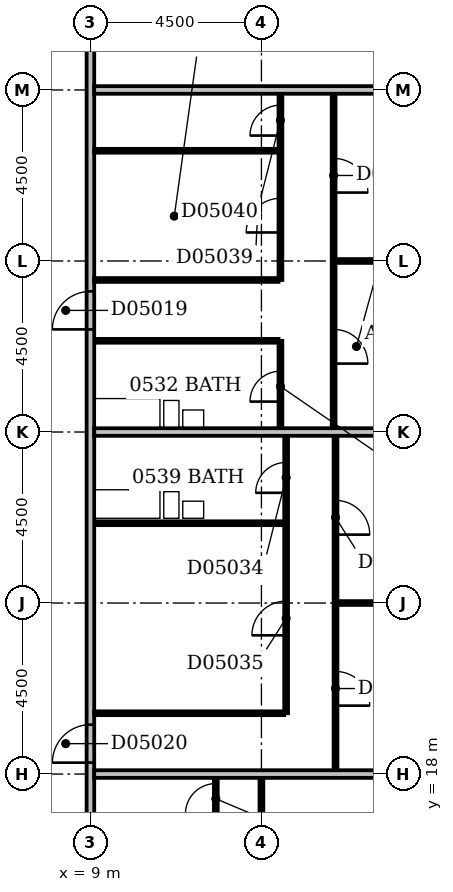
"""IFC4 building model, lengths in metres.
Left out: names, types, materials, properties, quantities, classifications, styles, units other than length and angle.
Written with IfcOpenShell. Run it as: python <this file> out.ifc"""

import sys

from ifc_helpers import new_model, si_unit, direction, frame, frame_2d, origin, place, context, subcontext, project, spatial, rectangle, extrude, element, fill, save


model = new_model("IFC4")
c1 = context("Model", 3, precision=1e-05, world=origin(), true_north=direction((0.0, 1.0)))
c2 = subcontext(c1, "Body", "Model", "MODEL_VIEW")
j1 = project(units=[si_unit("LENGTHUNIT", "METRE"), si_unit("PLANEANGLEUNIT", "RADIAN")], contexts=[c1])
p1 = place(None, origin())
s1 = spatial("IfcSite", under=j1, at=p1, CompositionType="ELEMENT")
p2 = place(p1, origin())
s2 = spatial("IfcBuilding", under=s1, at=p2, CompositionType="ELEMENT")
p3 = place(p2, frame((0.0, 0.0, 29.0)))
s3 = spatial("IfcBuildingStorey", under=s2, at=p3, CompositionType="ELEMENT", Elevation=29.0)
p4 = place(p3, frame((9.0, 5.0, 0.0), z_axis=(0.0, 0.0, 1.0), x_axis=(0.0, 1.0, 0.0)))
e1 = element("IfcWall", 1, at=p4, inside=s3, PredefinedType="PARTITIONING", context=c2, shape_type="SweptSolid", body=[
    extrude(rectangle(XDim=44.5, YDim=0.2, at=frame_2d((22.25, 0.0))), origin(), (0.0, 0.0, 1.0), 3.3),
])
p5 = place(p4, frame((24.7, 0.0, 0.0)))
e2 = element("IfcOpeningElement", 2, at=p5, cuts=e1, PredefinedType="OPENING", context=c2, shape_type="SweptSolid", body=[
    extrude(rectangle(XDim=1.0, YDim=2.1, at=frame_2d((0.5, 1.05))), frame((0.0, 0.112, 0.0), z_axis=(0.0, -1.0, 0.0), x_axis=(1.0, 0.0, 0.0)), (0.0, 0.0, 1.0), 0.224),
])
p6 = place(p4, frame((13.3, 0.0, 0.0)))
e3 = element("IfcOpeningElement", 3, at=p6, cuts=e1, PredefinedType="OPENING", context=c2, shape_type="SweptSolid", body=[
    extrude(rectangle(XDim=1.0, YDim=2.1, at=frame_2d((0.5, 1.05))), frame((0.0, 0.112, 0.0), z_axis=(0.0, -1.0, 0.0), x_axis=(1.0, 0.0, 0.0)), (0.0, 0.0, 1.0), 0.224),
])
p7 = place(p4, frame((10.45, 0.0, 0.0)))
e4 = element("IfcOpeningElement", 4, at=p7, cuts=e1, PredefinedType="OPENING", context=c2, shape_type="SweptSolid", body=[
    extrude(rectangle(XDim=1.0, YDim=2.1, at=frame_2d((0.5, 1.05))), frame((0.0, 0.112, 0.0), z_axis=(0.0, -1.0, 0.0), x_axis=(1.0, 0.0, 0.0)), (0.0, 0.0, 1.0), 0.224),
])
p8 = place(p4, frame((5.95, 0.0, 0.0)))
e5 = element("IfcOpeningElement", 5, at=p8, cuts=e1, PredefinedType="OPENING", context=c2, shape_type="SweptSolid", body=[
    extrude(rectangle(XDim=1.0, YDim=2.1, at=frame_2d((0.5, 1.05))), frame((0.0, 0.112, 0.0), z_axis=(0.0, -1.0, 0.0), x_axis=(1.0, 0.0, 0.0)), (0.0, 0.0, 1.0), 0.224),
])
p9 = place(p4, frame((37.25, 0.0, 0.0)))
e6 = element("IfcOpeningElement", 6, at=p9, cuts=e1, PredefinedType="OPENING", context=c2, shape_type="SweptSolid", body=[
    extrude(rectangle(XDim=0.9, YDim=2.1, at=frame_2d((0.45, 1.05))), frame((0.0, 0.112, 0.0), z_axis=(0.0, -1.0, 0.0), x_axis=(1.0, 0.0, 0.0)), (0.0, 0.0, 1.0), 0.224),
])
p10 = place(p4, frame((1.5, 0.0, 0.0)))
e7 = element("IfcOpeningElement", 7, at=p10, cuts=e1, PredefinedType="OPENING", context=c2, shape_type="SweptSolid", body=[
    extrude(rectangle(XDim=0.9, YDim=2.1, at=frame_2d((0.45, 1.05))), frame((0.0, 0.112, 0.0), z_axis=(0.0, -1.0, 0.0), x_axis=(1.0, 0.0, 0.0)), (0.0, 0.0, 1.0), 0.224),
])
p11 = place(p3, frame((13.5, 9.6, 0.0), z_axis=(0.0, 0.0, 1.0), x_axis=(0.0, 1.0, 0.0)))
e8 = element("IfcWall", 8, at=p11, inside=s3, PredefinedType="PARTITIONING", context=c2, shape_type="SweptSolid", body=[
    extrude(rectangle(XDim=8.3, YDim=0.1, at=frame_2d((4.15, 0.0))), origin(), (0.0, 0.0, 1.0), 3.3),
])
p12 = place(p11, frame((5.7, 0.0, 0.0)))
e9 = element("IfcOpeningElement", 9, at=p12, cuts=e8, PredefinedType="OPENING", context=c2, shape_type="SweptSolid", body=[
    extrude(rectangle(XDim=0.9, YDim=2.1, at=frame_2d((0.45, 1.05))), frame((0.0, 0.062, 0.0), z_axis=(0.0, -1.0, 0.0), x_axis=(1.0, 0.0, 0.0)), (0.0, 0.0, 1.0), 0.124),
])
p13 = place(p11, frame((1.2, 0.0, 0.0)))
e10 = element("IfcOpeningElement", 10, at=p13, cuts=e8, PredefinedType="OPENING", context=c2, shape_type="SweptSolid", body=[
    extrude(rectangle(XDim=0.9, YDim=2.1, at=frame_2d((0.45, 1.05))), frame((0.0, 0.062, 0.0), z_axis=(0.0, -1.0, 0.0), x_axis=(1.0, 0.0, 0.0)), (0.0, 0.0, 1.0), 0.124),
])
p14 = place(p3, frame((12.3, 16.7, 0.0), z_axis=(0.0, 0.0, 1.0), x_axis=(0.0, 1.0, 0.0)))
e11 = element("IfcWall", 11, at=p14, inside=s3, PredefinedType="PARTITIONING", context=c2, shape_type="SweptSolid", body=[
    extrude(rectangle(XDim=1.2, YDim=0.1, at=frame_2d((0.6, 0.0))), origin(), (0.0, 0.0, 1.0), 3.3),
])
p15 = place(p14, frame((0.25, 0.0, 0.0)))
e12 = element("IfcOpeningElement", 12, at=p15, cuts=e11, PredefinedType="OPENING", context=c2, shape_type="SweptSolid", body=[
    extrude(rectangle(XDim=0.8, YDim=2.1, at=frame_2d((0.4, 1.05))), frame((0.0, 0.062, 0.0), z_axis=(0.0, -1.0, 0.0), x_axis=(1.0, 0.0, 0.0)), (0.0, 0.0, 1.0), 0.124),
])
p16 = place(p3, frame((9.1, 18.0, 0.0), z_axis=(0.0, 0.0, 1.0), x_axis=(1.0, 0.0, 0.0)))
e13 = element("IfcWall", 13, at=p16, inside=s3, PredefinedType="PARTITIONING", context=c2, shape_type="SweptSolid", body=[
    extrude(rectangle(XDim=8.3, YDim=0.2, at=frame_2d((4.15, 0.0))), origin(), (0.0, 0.0, 1.0), 2.6),
])
p17 = place(p3, frame((15.45, 18.1, 0.0), z_axis=(0.0, 0.0, 1.0), x_axis=(0.0, 1.0, 0.0)))
e14 = element("IfcWall", 14, at=p17, inside=s3, PredefinedType="PARTITIONING", context=c2, shape_type="SweptSolid", body=[
    extrude(rectangle(XDim=8.8, YDim=0.1, at=frame_2d((4.4, 0.0))), origin(), (0.0, 0.0, 1.0), 3.3),
])
p18 = place(p17, frame((1.7, 0.0, 0.0)))
e15 = element("IfcOpeningElement", 15, at=p18, cuts=e14, PredefinedType="OPENING", context=c2, shape_type="SweptSolid", body=[
    extrude(rectangle(XDim=0.9, YDim=2.1, at=frame_2d((0.45, 1.05))), frame((0.0, 0.062, 0.0), z_axis=(0.0, -1.0, 0.0), x_axis=(1.0, 0.0, 0.0)), (0.0, 0.0, 1.0), 0.124),
])
p19 = place(p17, frame((6.2, 0.0, 0.0)))
e16 = element("IfcOpeningElement", 16, at=p19, cuts=e14, PredefinedType="OPENING", context=c2, shape_type="SweptSolid", body=[
    extrude(rectangle(XDim=0.9, YDim=2.1, at=frame_2d((0.45, 1.05))), frame((0.0, 0.062, 0.0), z_axis=(0.0, -1.0, 0.0), x_axis=(1.0, 0.0, 0.0)), (0.0, 0.0, 1.0), 0.124),
])
p20 = place(p3, frame((9.1, 19.6, 0.0), z_axis=(0.0, 0.0, 1.0), x_axis=(1.0, 0.0, 0.0)))
e17 = element("IfcWall", 17, at=p20, inside=s3, PredefinedType="PARTITIONING", context=c2, shape_type="SweptSolid", body=[
    extrude(rectangle(XDim=5.0, YDim=0.1, at=frame_2d((2.5, 0.0))), origin(), (0.0, 0.0, 1.0), 3.3),
])
p21 = place(p3, frame((14.15, 19.6, 0.0), z_axis=(0.0, 0.0, 1.0), x_axis=(0.0, 1.0, 0.0)))
e18 = element("IfcWall", 18, at=p21, inside=s3, PredefinedType="PARTITIONING", context=c2, shape_type="SweptSolid", body=[
    extrude(rectangle(XDim=7.3, YDim=0.1, at=frame_2d((3.65, 0.0))), origin(), (0.0, 0.0, 1.0), 3.3),
])
p22 = place(p21, frame((5.8, 0.0, 0.0)))
e19 = element("IfcOpeningElement", 19, at=p22, cuts=e18, PredefinedType="OPENING", context=c2, shape_type="SweptSolid", body=[
    extrude(rectangle(XDim=0.8, YDim=2.1, at=frame_2d((0.4, 1.05))), frame((0.0, 0.062, 0.0), z_axis=(0.0, -1.0, 0.0), x_axis=(1.0, 0.0, 0.0)), (0.0, 0.0, 1.0), 0.124),
])
p23 = place(p21, frame((2.05, 0.0, 0.0)))
e20 = element("IfcOpeningElement", 20, at=p23, cuts=e18, PredefinedType="OPENING", context=c2, shape_type="SweptSolid", body=[
    extrude(rectangle(XDim=0.9, YDim=2.1, at=frame_2d((0.45, 1.05))), frame((0.0, 0.062, 0.0), z_axis=(0.0, -1.0, 0.0), x_axis=(1.0, 0.0, 0.0)), (0.0, 0.0, 1.0), 0.124),
])
p24 = place(p3, frame((15.5, 22.5, 0.0), z_axis=(0.0, 0.0, 1.0), x_axis=(1.0, 0.0, 0.0)))
e21 = element("IfcWall", 21, at=p24, inside=s3, PredefinedType="PARTITIONING", context=c2, shape_type="SweptSolid", body=[
    extrude(rectangle(XDim=6.4, YDim=0.1, at=frame_2d((3.2, 0.0))), origin(), (0.0, 0.0, 1.0), 3.3),
])
p25 = place(p3, frame((9.1, 24.6, 0.0), z_axis=(0.0, 0.0, 1.0), x_axis=(1.0, 0.0, 0.0)))
e22 = element("IfcWall", 22, at=p25, inside=s3, PredefinedType="PLUMBINGWALL", context=c2, shape_type="SweptSolid", body=[
    extrude(rectangle(XDim=5.0, YDim=0.1, at=frame_2d((2.5, 0.0))), origin(), (0.0, 0.0, 1.0), 3.3),
])
p26 = place(p3, frame((9.1, 27.0, 0.0), z_axis=(0.0, 0.0, 1.0), x_axis=(1.0, 0.0, 0.0)))
e23 = element("IfcWall", 23, at=p26, inside=s3, PredefinedType="PARTITIONING", context=c2, shape_type="SweptSolid", body=[
    extrude(rectangle(XDim=12.8, YDim=0.2, at=frame_2d((6.4, 0.0))), origin(), (0.0, 0.0, 1.0), 2.7),
])
p27 = place(p3, frame((14.0, 27.1, 0.0), z_axis=(0.0, 0.0, 1.0), x_axis=(0.0, 1.0, 0.0)))
e24 = element("IfcWall", 24, at=p27, inside=s3, PredefinedType="PARTITIONING", context=c2, shape_type="SweptSolid", body=[
    extrude(rectangle(XDim=2.3, YDim=0.1, at=frame_2d((1.15, 0.0))), origin(), (0.0, 0.0, 1.0), 3.3),
])
p28 = place(p27, frame((0.7, 0.0, 0.0)))
e25 = element("IfcOpeningElement", 25, at=p28, cuts=e24, PredefinedType="OPENING", context=c2, shape_type="SweptSolid", body=[
    extrude(rectangle(XDim=0.8, YDim=2.1, at=frame_2d((0.4, 1.05))), frame((0.0, 0.062, 0.0), z_axis=(0.0, -1.0, 0.0), x_axis=(1.0, 0.0, 0.0)), (0.0, 0.0, 1.0), 0.124),
])
p29 = place(p3, frame((15.4, 27.1, 0.0), z_axis=(0.0, 0.0, 1.0), x_axis=(0.0, 1.0, 0.0)))
e26 = element("IfcWall", 26, at=p29, inside=s3, PredefinedType="PARTITIONING", context=c2, shape_type="SweptSolid", body=[
    extrude(rectangle(XDim=8.8, YDim=0.1, at=frame_2d((4.4, 0.0))), origin(), (0.0, 0.0, 1.0), 3.3),
])
p30 = place(p29, frame((1.7, 0.0, 0.0)))
e27 = element("IfcOpeningElement", 27, at=p30, cuts=e26, PredefinedType="OPENING", context=c2, shape_type="SweptSolid", body=[
    extrude(rectangle(XDim=0.9, YDim=2.1, at=frame_2d((0.45, 1.05))), frame((0.0, 0.062, 0.0), z_axis=(0.0, -1.0, 0.0), x_axis=(1.0, 0.0, 0.0)), (0.0, 0.0, 1.0), 0.124),
])
p31 = place(p29, frame((6.2, 0.0, 0.0)))
e28 = element("IfcOpeningElement", 28, at=p31, cuts=e26, PredefinedType="OPENING", context=c2, shape_type="SweptSolid", body=[
    extrude(rectangle(XDim=0.9, YDim=2.1, at=frame_2d((0.45, 1.05))), frame((0.0, 0.062, 0.0), z_axis=(0.0, -1.0, 0.0), x_axis=(1.0, 0.0, 0.0)), (0.0, 0.0, 1.0), 0.124),
])
p32 = place(p3, frame((9.1, 29.4, 0.0), z_axis=(0.0, 0.0, 1.0), x_axis=(1.0, 0.0, 0.0)))
e29 = element("IfcWall", 29, at=p32, inside=s3, PredefinedType="PLUMBINGWALL", context=c2, shape_type="SweptSolid", body=[
    extrude(rectangle(XDim=4.85, YDim=0.1, at=frame_2d((2.425, 0.0))), origin(), (0.0, 0.0, 1.0), 3.3),
])
p33 = place(p3, frame((9.1, 31.0, 0.0), z_axis=(0.0, 0.0, 1.0), x_axis=(1.0, 0.0, 0.0)))
e30 = element("IfcWall", 30, at=p33, inside=s3, PredefinedType="PARTITIONING", context=c2, shape_type="SweptSolid", body=[
    extrude(rectangle(XDim=4.85, YDim=0.1, at=frame_2d((2.425, 0.0))), origin(), (0.0, 0.0, 1.0), 3.3),
])
p34 = place(p3, frame((14.0, 31.0, 0.0), z_axis=(0.0, 0.0, 1.0), x_axis=(0.0, 1.0, 0.0)))
e31 = element("IfcWall", 31, at=p34, inside=s3, PredefinedType="PARTITIONING", context=c2, shape_type="SweptSolid", body=[
    extrude(rectangle(XDim=4.9, YDim=0.1, at=frame_2d((2.45, 0.0))), origin(), (0.0, 0.0, 1.0), 3.3),
])
p35 = place(p34, frame((1.25, 0.0, 0.0)))
e32 = element("IfcOpeningElement", 32, at=p35, cuts=e31, PredefinedType="OPENING", context=c2, shape_type="SweptSolid", body=[
    extrude(rectangle(XDim=0.9, YDim=2.1, at=frame_2d((0.45, 1.05))), frame((0.0, 0.062, 0.0), z_axis=(0.0, -1.0, 0.0), x_axis=(1.0, 0.0, 0.0)), (0.0, 0.0, 1.0), 0.124),
])
p36 = place(p34, frame((3.8, 0.0, 0.0)))
e33 = element("IfcOpeningElement", 33, at=p36, cuts=e31, PredefinedType="OPENING", context=c2, shape_type="SweptSolid", body=[
    extrude(rectangle(XDim=0.8, YDim=2.1, at=frame_2d((0.4, 1.05))), frame((0.0, 0.062, 0.0), z_axis=(0.0, -1.0, 0.0), x_axis=(1.0, 0.0, 0.0)), (0.0, 0.0, 1.0), 0.124),
])
p37 = place(p3, frame((15.45, 31.5, 0.0), z_axis=(0.0, 0.0, 1.0), x_axis=(1.0, 0.0, 0.0)))
e34 = element("IfcWall", 34, at=p37, inside=s3, PredefinedType="PARTITIONING", context=c2, shape_type="SweptSolid", body=[
    extrude(rectangle(XDim=6.45, YDim=0.1, at=frame_2d((3.225, 0.0))), origin(), (0.0, 0.0, 1.0), 3.3),
])
p38 = place(p3, frame((9.1, 34.4, 0.0), z_axis=(0.0, 0.0, 1.0), x_axis=(1.0, 0.0, 0.0)))
e35 = element("IfcWall", 35, at=p38, inside=s3, PredefinedType="PARTITIONING", context=c2, shape_type="SweptSolid", body=[
    extrude(rectangle(XDim=4.85, YDim=0.1, at=frame_2d((2.425, 0.0))), origin(), (0.0, 0.0, 1.0), 3.3),
])
p39 = place(p3, frame((9.1, 36.0, 0.0), z_axis=(0.0, 0.0, 1.0), x_axis=(1.0, 0.0, 0.0)))
e36 = element("IfcWall", 36, at=p39, inside=s3, PredefinedType="PARTITIONING", context=c2, shape_type="SweptSolid", body=[
    extrude(rectangle(XDim=12.8, YDim=0.2, at=frame_2d((6.4, 0.0))), origin(), (0.0, 0.0, 1.0), 2.4),
])
p40 = place(p5, origin())
e37 = element("IfcDoor", 37, at=p40, inside=s3, OperationType="SINGLE_SWING_LEFT", PredefinedType="DOOR", context=c2, shape_type="SweptSolid", body=[
    extrude(rectangle(XDim=1.0, YDim=2.1, at=frame_2d((0.5, 1.05))), frame((0.0, 0.025, 0.0), z_axis=(0.0, -1.0, 0.0), x_axis=(1.0, 0.0, 0.0)), (0.0, 0.0, 1.0), 0.05),
])
fill(e2, e37)
p41 = place(p6, origin())
e38 = element("IfcDoor", 38, at=p41, inside=s3, OperationType="SINGLE_SWING_LEFT", PredefinedType="DOOR", context=c2, shape_type="SweptSolid", body=[
    extrude(rectangle(XDim=1.0, YDim=2.1, at=frame_2d((0.5, 1.05))), frame((0.0, 0.025, 0.0), z_axis=(0.0, -1.0, 0.0), x_axis=(1.0, 0.0, 0.0)), (0.0, 0.0, 1.0), 0.05),
])
fill(e3, e38)
p42 = place(p15, origin())
e39 = element("IfcDoor", 39, at=p42, inside=s3, OperationType="SINGLE_SWING_LEFT", PredefinedType="DOOR", context=c2, shape_type="SweptSolid", body=[
    extrude(rectangle(XDim=0.8, YDim=2.1, at=frame_2d((0.4, 1.05))), frame((0.0, 0.025, 0.0), z_axis=(0.0, -1.0, 0.0), x_axis=(1.0, 0.0, 0.0)), (0.0, 0.0, 1.0), 0.05),
])
fill(e12, e39)
p43 = place(p18, frame((0.9, 0.0, 0.0), z_axis=(0.0, 0.0, 1.0), x_axis=(-1.0, 0.0, 0.0)))
e40 = element("IfcDoor", 40, at=p43, inside=s3, OperationType="SINGLE_SWING_RIGHT", PredefinedType="DOOR", context=c2, shape_type="SweptSolid", body=[
    extrude(rectangle(XDim=0.9, YDim=2.1, at=frame_2d((0.45, 1.05))), frame((0.0, 0.025, 0.0), z_axis=(0.0, -1.0, 0.0), x_axis=(1.0, 0.0, 0.0)), (0.0, 0.0, 1.0), 0.05),
])
fill(e15, e40)
p44 = place(p19, frame((0.9, 0.0, 0.0), z_axis=(0.0, 0.0, 1.0), x_axis=(-1.0, 0.0, 0.0)))
e41 = element("IfcDoor", 41, at=p44, inside=s3, OperationType="SINGLE_SWING_RIGHT", PredefinedType="DOOR", context=c2, shape_type="SweptSolid", body=[
    extrude(rectangle(XDim=0.9, YDim=2.1, at=frame_2d((0.45, 1.05))), frame((0.0, 0.025, 0.0), z_axis=(0.0, -1.0, 0.0), x_axis=(1.0, 0.0, 0.0)), (0.0, 0.0, 1.0), 0.05),
])
fill(e16, e41)
p45 = place(p22, origin())
e42 = element("IfcDoor", 42, at=p45, inside=s3, OperationType="SINGLE_SWING_LEFT", PredefinedType="DOOR", context=c2, shape_type="SweptSolid", body=[
    extrude(rectangle(XDim=0.8, YDim=2.1, at=frame_2d((0.4, 1.05))), frame((0.0, 0.025, 0.0), z_axis=(0.0, -1.0, 0.0), x_axis=(1.0, 0.0, 0.0)), (0.0, 0.0, 1.0), 0.05),
])
fill(e19, e42)
p46 = place(p23, origin())
e43 = element("IfcDoor", 43, at=p46, inside=s3, OperationType="SINGLE_SWING_LEFT", PredefinedType="DOOR", context=c2, shape_type="SweptSolid", body=[
    extrude(rectangle(XDim=0.9, YDim=2.1, at=frame_2d((0.45, 1.05))), frame((0.0, 0.025, 0.0), z_axis=(0.0, -1.0, 0.0), x_axis=(1.0, 0.0, 0.0)), (0.0, 0.0, 1.0), 0.05),
])
fill(e20, e43)
p47 = place(p28, origin())
e44 = element("IfcDoor", 44, at=p47, inside=s3, OperationType="SINGLE_SWING_LEFT", PredefinedType="DOOR", context=c2, shape_type="SweptSolid", body=[
    extrude(rectangle(XDim=0.8, YDim=2.1, at=frame_2d((0.4, 1.05))), frame((0.0, 0.025, 0.0), z_axis=(0.0, -1.0, 0.0), x_axis=(1.0, 0.0, 0.0)), (0.0, 0.0, 1.0), 0.05),
])
fill(e25, e44)
p48 = place(p30, frame((0.9, 0.0, 0.0), z_axis=(0.0, 0.0, 1.0), x_axis=(-1.0, 0.0, 0.0)))
e45 = element("IfcDoor", 45, at=p48, inside=s3, OperationType="SINGLE_SWING_RIGHT", PredefinedType="DOOR", context=c2, shape_type="SweptSolid", body=[
    extrude(rectangle(XDim=0.9, YDim=2.1, at=frame_2d((0.45, 1.05))), frame((0.0, 0.025, 0.0), z_axis=(0.0, -1.0, 0.0), x_axis=(1.0, 0.0, 0.0)), (0.0, 0.0, 1.0), 0.05),
])
fill(e27, e45)
p49 = place(p31, frame((0.9, 0.0, 0.0), z_axis=(0.0, 0.0, 1.0), x_axis=(-1.0, 0.0, 0.0)))
e46 = element("IfcDoor", 46, at=p49, inside=s3, OperationType="SINGLE_SWING_RIGHT", PredefinedType="DOOR", context=c2, shape_type="SweptSolid", body=[
    extrude(rectangle(XDim=0.9, YDim=2.1, at=frame_2d((0.45, 1.05))), frame((0.0, 0.025, 0.0), z_axis=(0.0, -1.0, 0.0), x_axis=(1.0, 0.0, 0.0)), (0.0, 0.0, 1.0), 0.05),
])
fill(e28, e46)
p50 = place(p35, origin())
e47 = element("IfcDoor", 47, at=p50, inside=s3, OperationType="SINGLE_SWING_LEFT", PredefinedType="DOOR", context=c2, shape_type="SweptSolid", body=[
    extrude(rectangle(XDim=0.9, YDim=2.1, at=frame_2d((0.45, 1.05))), frame((0.0, 0.025, 0.0), z_axis=(0.0, -1.0, 0.0), x_axis=(1.0, 0.0, 0.0)), (0.0, 0.0, 1.0), 0.05),
])
fill(e32, e47)
p51 = place(p36, origin())
e48 = element("IfcDoor", 48, at=p51, inside=s3, OperationType="SINGLE_SWING_LEFT", PredefinedType="DOOR", context=c2, shape_type="SweptSolid", body=[
    extrude(rectangle(XDim=0.8, YDim=2.1, at=frame_2d((0.4, 1.05))), frame((0.0, 0.025, 0.0), z_axis=(0.0, -1.0, 0.0), x_axis=(1.0, 0.0, 0.0)), (0.0, 0.0, 1.0), 0.05),
])
fill(e33, e48)
save(model, sys.argv[1])
